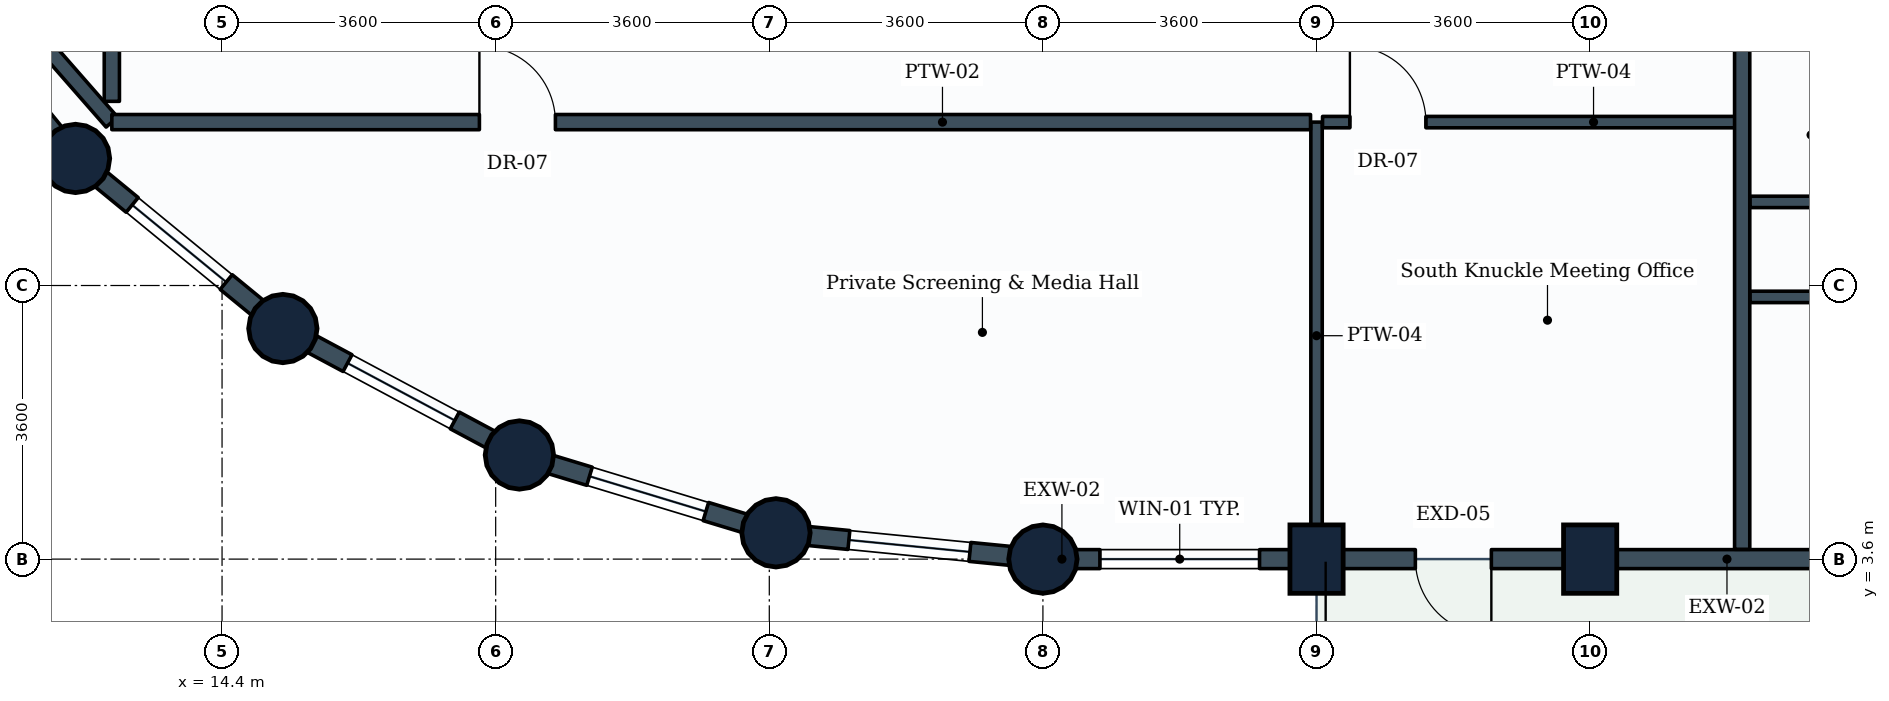
"""IFC4 building model, lengths in metres.
Left out: names, types, materials, properties, quantities, classifications, styles, units other than length and angle.
Written with IfcOpenShell. Run it as: python <this file> out.ifc"""

import sys

from ifc_helpers import new_model, si_unit, direction, frame, frame_2d, origin, origin_2d, place, context, subcontext, project, spatial, rectangle, circle, extrude, element, fill, save


model = new_model("IFC4")
c1 = context("Model", 3, precision=1e-05, world=origin(), true_north=direction((0.0, 1.0)))
c2 = subcontext(c1, "Body", "Model", "MODEL_VIEW")
j1 = project(units=[si_unit("LENGTHUNIT", "METRE"), si_unit("PLANEANGLEUNIT", "RADIAN")], contexts=[c1])
p1 = place(None, origin())
s1 = spatial("IfcSite", under=j1, at=p1, CompositionType="ELEMENT")
p2 = place(p1, origin())
s2 = spatial("IfcBuilding", under=s1, at=p2, CompositionType="ELEMENT")
p3 = place(p2, frame((0.0, 0.0, 178.6)))
s3 = spatial("IfcBuildingStorey", under=s2, at=p3, CompositionType="ELEMENT", Elevation=178.6)
for number, where, z_axis, x_axis in (
    (1, (12.472, 8.872, 0.0), (0.0, 0.0, 1.0), (1.0, 0.0, 0.0)),
    (2, (15.2, 6.634, 0.0), (0.0, 0.0, 1.0), (1.0, 0.0, 0.0)),
    (3, (18.312, 4.97, 0.0), (0.0, 0.0, 1.0), (1.0, 0.0, 0.0)),
    (4, (21.688, 3.946, 0.0), (0.0, 0.0, 1.0), (1.0, 0.0, 0.0)),
    (5, (25.2, 3.6, 0.0), (0.0, 0.0, 1.0), (1.0, 0.0, 0.0)),
):
    element("IfcColumn", number, at=place(p3, frame(where, z_axis=z_axis, x_axis=x_axis)), inside=s3, PredefinedType="COLUMN", context=c2, shape_type="SweptSolid", body=[
        extrude(circle(Radius=0.45, at=origin_2d()), origin(), (0.0, 0.0, 1.0), 3.8),
    ])
for number, where, z_axis, x_axis in (
    (6, (28.8, 3.6, 0.0), (0.0, 0.0, 1.0), (1.0, 0.0, 0.0)),
    (7, (32.4, 3.6, 0.0), (0.0, 0.0, 1.0), (1.0, 0.0, 0.0)),
):
    element("IfcColumn", number, at=place(p3, frame(where, z_axis=z_axis, x_axis=x_axis)), inside=s3, PredefinedType="COLUMN", context=c2, shape_type="SweptSolid", body=[
        extrude(rectangle(XDim=0.7, YDim=0.9, at=origin_2d()), origin(), (0.0, 0.0, 1.0), 3.8),
    ])
p4 = place(p3, frame((28.8, 3.6, 0.0), z_axis=(0.0, 0.0, 1.0), x_axis=(-1.0, 0.0, 0.0)))
e8 = element("IfcWall", 8, at=p4, inside=s3, PredefinedType="STANDARD", context=c2, shape_type="SweptSolid", body=[
    extrude(rectangle(XDim=3.6, YDim=0.25, at=frame_2d((1.8, 0.0))), origin(), (0.0, 0.0, 1.0), 2.93),
])
p5 = place(p4, frame((0.75, 0.0, 0.85)))
e9 = element("IfcOpeningElement", 9, at=p5, cuts=e8, PredefinedType="OPENING", context=c2, shape_type="SweptSolid", body=[
    extrude(rectangle(XDim=2.1, YDim=1.35, at=frame_2d((1.05, 0.675))), frame((0.0, 0.135, 0.0), z_axis=(0.0, -1.0, 0.0), x_axis=(1.0, 0.0, 0.0)), (0.0, 0.0, 1.0), 0.27),
])
p6 = place(p3, frame((32.4, 3.6, 0.0), z_axis=(0.0, 0.0, 1.0), x_axis=(-1.0, 0.0, 0.0)))
e10 = element("IfcWall", 10, at=p6, inside=s3, PredefinedType="STANDARD", context=c2, shape_type="SweptSolid", body=[
    extrude(rectangle(XDim=3.6, YDim=0.25, at=frame_2d((1.8, 0.0))), origin(), (0.0, 0.0, 1.0), 2.93),
])
p7 = place(p6, frame((1.3, 0.0, 0.0)))
e11 = element("IfcOpeningElement", 11, at=p7, cuts=e10, PredefinedType="OPENING", context=c2, shape_type="SweptSolid", body=[
    extrude(rectangle(XDim=1.0, YDim=2.1, at=frame_2d((0.5, 1.05))), frame((0.0, 0.135, 0.0), z_axis=(0.0, -1.0, 0.0), x_axis=(1.0, 0.0, 0.0)), (0.0, 0.0, 1.0), 0.27),
])
p8 = place(p3, frame((36.0, 3.6, 0.0), z_axis=(0.0, 0.0, 1.0), x_axis=(-1.0, 0.0, 0.0)))
e12 = element("IfcWall", 12, at=p8, inside=s3, PredefinedType="STANDARD", context=c2, shape_type="SweptSolid", body=[
    extrude(rectangle(XDim=3.6, YDim=0.25, at=frame_2d((1.8, 0.0))), origin(), (0.0, 0.0, 1.0), 2.93),
])
p9 = place(p3, frame((12.472, 8.872, 0.0), z_axis=(0.0, 0.0, 1.0), x_axis=(-0.634258295121, 0.773121216285, 0.0)))
e13 = element("IfcWall", 13, at=p9, inside=s3, PredefinedType="STANDARD", context=c2, shape_type="SweptSolid", body=[
    extrude(rectangle(XDim=3.529, YDim=0.25, at=frame_2d((1.764, 0.0))), origin(), (0.0, 0.0, 1.0), 2.93),
])
p10 = place(p9, frame((0.964, 0.0, 0.85)))
e14 = element("IfcOpeningElement", 14, at=p10, cuts=e13, PredefinedType="OPENING", context=c2, shape_type="SweptSolid", body=[
    extrude(rectangle(XDim=1.6, YDim=1.35, at=frame_2d((0.8, 0.675))), frame((0.0, 0.135, 0.0), z_axis=(0.0, -1.0, 0.0), x_axis=(1.0, 0.0, 0.0)), (0.0, 0.0, 1.0), 0.27),
])
p11 = place(p3, frame((15.2, 6.634, 0.0), z_axis=(0.0, 0.0, 1.0), x_axis=(-0.773121216285, 0.634258295121, 0.0)))
e15 = element("IfcWall", 15, at=p11, inside=s3, PredefinedType="STANDARD", context=c2, shape_type="SweptSolid", body=[
    extrude(rectangle(XDim=3.529, YDim=0.25, at=frame_2d((1.764, 0.0))), origin(), (0.0, 0.0, 1.0), 2.93),
])
p12 = place(p11, frame((0.964, 0.0, 0.85)))
e16 = element("IfcOpeningElement", 16, at=p12, cuts=e15, PredefinedType="OPENING", context=c2, shape_type="SweptSolid", body=[
    extrude(rectangle(XDim=1.6, YDim=1.35, at=frame_2d((0.8, 0.675))), frame((0.0, 0.135, 0.0), z_axis=(0.0, -1.0, 0.0), x_axis=(1.0, 0.0, 0.0)), (0.0, 0.0, 1.0), 0.27),
])
p13 = place(p3, frame((18.312, 4.97, 0.0), z_axis=(0.0, 0.0, 1.0), x_axis=(-0.881846862014, 0.471535907389, 0.0)))
e17 = element("IfcWall", 17, at=p13, inside=s3, PredefinedType="STANDARD", context=c2, shape_type="SweptSolid", body=[
    extrude(rectangle(XDim=3.529, YDim=0.25, at=frame_2d((1.765, 0.0))), origin(), (0.0, 0.0, 1.0), 2.93),
])
p14 = place(p13, frame((0.964, 0.0, 0.85)))
e18 = element("IfcOpeningElement", 18, at=p14, cuts=e17, PredefinedType="OPENING", context=c2, shape_type="SweptSolid", body=[
    extrude(rectangle(XDim=1.6, YDim=1.35, at=frame_2d((0.8, 0.675))), frame((0.0, 0.135, 0.0), z_axis=(0.0, -1.0, 0.0), x_axis=(1.0, 0.0, 0.0)), (0.0, 0.0, 1.0), 0.27),
])
p15 = place(p3, frame((21.688, 3.946, 0.0), z_axis=(0.0, 0.0, 1.0), x_axis=(-0.956953367403, 0.290241714123, 0.0)))
e19 = element("IfcWall", 19, at=p15, inside=s3, PredefinedType="STANDARD", context=c2, shape_type="SweptSolid", body=[
    extrude(rectangle(XDim=3.528, YDim=0.25, at=frame_2d((1.764, 0.0))), origin(), (0.0, 0.0, 1.0), 2.93),
])
p16 = place(p15, frame((0.964, 0.0, 0.85)))
e20 = element("IfcOpeningElement", 20, at=p16, cuts=e19, PredefinedType="OPENING", context=c2, shape_type="SweptSolid", body=[
    extrude(rectangle(XDim=1.6, YDim=1.35, at=frame_2d((0.8, 0.675))), frame((0.0, 0.135, 0.0), z_axis=(0.0, -1.0, 0.0), x_axis=(1.0, 0.0, 0.0)), (0.0, 0.0, 1.0), 0.27),
])
p17 = place(p3, frame((25.2, 3.6, 0.0), z_axis=(0.0, 0.0, 1.0), x_axis=(-0.995183369056, 0.098030923459, 0.0)))
e21 = element("IfcWall", 21, at=p17, inside=s3, PredefinedType="STANDARD", context=c2, shape_type="SweptSolid", body=[
    extrude(rectangle(XDim=3.529, YDim=0.25, at=frame_2d((1.765, 0.0))), origin(), (0.0, 0.0, 1.0), 2.93),
])
p18 = place(p17, frame((0.965, 0.0, 0.85)))
e22 = element("IfcOpeningElement", 22, at=p18, cuts=e21, PredefinedType="OPENING", context=c2, shape_type="SweptSolid", body=[
    extrude(rectangle(XDim=1.6, YDim=1.35, at=frame_2d((0.8, 0.675))), frame((0.0, 0.135, 0.0), z_axis=(0.0, -1.0, 0.0), x_axis=(1.0, 0.0, 0.0)), (0.0, 0.0, 1.0), 0.27),
])
p19 = place(p3, frame((28.8, 9.35, 0.0), z_axis=(0.0, 0.0, 1.0), x_axis=(0.0, -1.0, 0.0)))
e23 = element("IfcWall", 23, at=p19, inside=s3, PredefinedType="PARTITIONING", context=c2, shape_type="SweptSolid", body=[
    extrude(rectangle(XDim=5.621, YDim=0.15, at=frame_2d((2.811, 0.0))), origin(), (0.0, 0.0, 1.0), 3.535),
])
p20 = place(p3, frame((12.95, 9.35, 0.0), z_axis=(0.0, 0.0, 1.0), x_axis=(-0.658639514157, 0.752458630352, 0.0)))
e24 = element("IfcWall", 24, at=p20, inside=s3, PredefinedType="PARTITIONING", context=c2, shape_type="SweptSolid", body=[
    extrude(rectangle(XDim=4.996, YDim=0.2, at=frame_2d((2.498, 0.0))), origin(), (0.0, 0.0, 1.0), 2.93),
])
p21 = place(p3, frame((12.95, 9.623, 0.0), z_axis=(0.0, 0.0, 1.0), x_axis=(0.0, 1.0, 0.0)))
e25 = element("IfcWall", 25, at=p21, inside=s3, PredefinedType="PARTITIONING", context=c2, shape_type="SweptSolid", body=[
    extrude(rectangle(XDim=6.873, YDim=0.2, at=frame_2d((3.437, 0.0))), origin(), (0.0, 0.0, 1.0), 3.17),
])
p22 = place(p21, frame((3.958, 0.0, 0.0)))
e26 = element("IfcOpeningElement", 26, at=p22, cuts=e25, PredefinedType="OPENING", context=c2, shape_type="SweptSolid", body=[
    extrude(rectangle(XDim=1.0, YDim=2.1, at=frame_2d((0.5, 1.05))), frame((0.0, 0.11, 0.0), z_axis=(0.0, -1.0, 0.0), x_axis=(1.0, 0.0, 0.0)), (0.0, 0.0, 1.0), 0.22),
])
p23 = place(p3, frame((12.95, 9.35, 0.0), z_axis=(0.0, 0.0, 1.0), x_axis=(1.0, 0.0, 0.0)))
e27 = element("IfcWall", 27, at=p23, inside=s3, PredefinedType="PARTITIONING", context=c2, shape_type="SweptSolid", body=[
    extrude(rectangle(XDim=15.771, YDim=0.2, at=frame_2d((7.885, 0.0))), origin(), (0.0, 0.0, 1.0), 3.17),
])
p24 = place(p23, frame((4.836, 0.0, 0.0)))
e28 = element("IfcOpeningElement", 28, at=p24, cuts=e27, PredefinedType="OPENING", context=c2, shape_type="SweptSolid", body=[
    extrude(rectangle(XDim=1.0, YDim=2.1, at=frame_2d((0.5, 1.05))), frame((0.0, 0.11, 0.0), z_axis=(0.0, -1.0, 0.0), x_axis=(1.0, 0.0, 0.0)), (0.0, 0.0, 1.0), 0.22),
])
p25 = place(p3, frame((28.879, 9.35, 0.0), z_axis=(0.0, 0.0, 1.0), x_axis=(1.0, 0.0, 0.0)))
e29 = element("IfcWall", 29, at=p25, inside=s3, PredefinedType="PARTITIONING", context=c2, shape_type="SweptSolid", body=[
    extrude(rectangle(XDim=5.521, YDim=0.15, at=frame_2d((2.76, 0.0))), origin(), (0.0, 0.0, 1.0), 3.535),
])
p26 = place(p25, frame((0.36, 0.0, 0.0)))
e30 = element("IfcOpeningElement", 30, at=p26, cuts=e29, PredefinedType="OPENING", context=c2, shape_type="SweptSolid", body=[
    extrude(rectangle(XDim=1.0, YDim=2.1, at=frame_2d((0.5, 1.05))), frame((0.0, 0.085, 0.0), z_axis=(0.0, -1.0, 0.0), x_axis=(1.0, 0.0, 0.0)), (0.0, 0.0, 1.0), 0.17),
])
p27 = place(p3, frame((34.4, 3.729, 0.0), z_axis=(0.0, 0.0, 1.0), x_axis=(0.0, 1.0, 0.0)))
e31 = element("IfcWall", 31, at=p27, inside=s3, PredefinedType="PARTITIONING", context=c2, shape_type="SweptSolid", body=[
    extrude(rectangle(XDim=6.921, YDim=0.2, at=frame_2d((3.46, 0.0))), origin(), (0.0, 0.0, 1.0), 2.93),
])
p28 = place(p3, frame((34.504, 8.3, 0.0), z_axis=(0.0, 0.0, 1.0), x_axis=(1.0, 0.0, 0.0)))
e32 = element("IfcWall", 32, at=p28, inside=s3, PredefinedType="PARTITIONING", context=c2, shape_type="SweptSolid", body=[
    extrude(rectangle(XDim=2.217, YDim=0.15, at=frame_2d((1.108, 0.0))), origin(), (0.0, 0.0, 1.0), 3.22),
])
p29 = place(p3, frame((34.504, 7.05, 0.0), z_axis=(0.0, 0.0, 1.0), x_axis=(1.0, 0.0, 0.0)))
e33 = element("IfcWall", 33, at=p29, inside=s3, PredefinedType="PARTITIONING", context=c2, shape_type="SweptSolid", body=[
    extrude(rectangle(XDim=2.996, YDim=0.15, at=frame_2d((1.498, 0.0))), origin(), (0.0, 0.0, 1.0), 3.17),
])
p30 = place(p29, frame((1.021, 0.0, 0.0)))
e34 = element("IfcOpeningElement", 34, at=p30, cuts=e33, PredefinedType="OPENING", context=c2, shape_type="SweptSolid", body=[
    extrude(rectangle(XDim=0.85, YDim=2.1, at=frame_2d((0.425, 1.05))), frame((0.0, 0.085, 0.0), z_axis=(0.0, -1.0, 0.0), x_axis=(1.0, 0.0, 0.0)), (0.0, 0.0, 1.0), 0.17),
])
p31 = place(p5, origin())
e35 = element("IfcWindow", 35, at=p31, inside=s3, PartitioningType="SINGLE_PANEL", PredefinedType="WINDOW", context=c2, shape_type="SweptSolid", body=[
    extrude(rectangle(XDim=2.1, YDim=1.35, at=frame_2d((1.05, 0.675))), frame((0.0, 0.03, 0.0), z_axis=(0.0, -1.0, 0.0), x_axis=(1.0, 0.0, 0.0)), (0.0, 0.0, 1.0), 0.06),
])
fill(e9, e35)
p32 = place(p7, origin())
e36 = element("IfcDoor", 36, at=p32, inside=s3, OperationType="SINGLE_SWING_LEFT", PredefinedType="DOOR", context=c2, shape_type="SweptSolid", body=[
    extrude(rectangle(XDim=1.0, YDim=2.1, at=frame_2d((0.5, 1.05))), frame((0.0, 0.025, 0.0), z_axis=(0.0, -1.0, 0.0), x_axis=(1.0, 0.0, 0.0)), (0.0, 0.0, 1.0), 0.05),
])
fill(e11, e36)
p33 = place(p12, origin())
e37 = element("IfcWindow", 37, at=p33, inside=s3, PartitioningType="SINGLE_PANEL", PredefinedType="WINDOW", context=c2, shape_type="SweptSolid", body=[
    extrude(rectangle(XDim=1.6, YDim=1.35, at=frame_2d((0.8, 0.675))), frame((0.0, 0.03, 0.0), z_axis=(0.0, -1.0, 0.0), x_axis=(1.0, 0.0, 0.0)), (0.0, 0.0, 1.0), 0.06),
])
fill(e16, e37)
p34 = place(p14, origin())
e38 = element("IfcWindow", 38, at=p34, inside=s3, PartitioningType="SINGLE_PANEL", PredefinedType="WINDOW", context=c2, shape_type="SweptSolid", body=[
    extrude(rectangle(XDim=1.6, YDim=1.35, at=frame_2d((0.8, 0.675))), frame((0.0, 0.03, 0.0), z_axis=(0.0, -1.0, 0.0), x_axis=(1.0, 0.0, 0.0)), (0.0, 0.0, 1.0), 0.06),
])
fill(e18, e38)
p35 = place(p16, origin())
e39 = element("IfcWindow", 39, at=p35, inside=s3, PartitioningType="SINGLE_PANEL", PredefinedType="WINDOW", context=c2, shape_type="SweptSolid", body=[
    extrude(rectangle(XDim=1.6, YDim=1.35, at=frame_2d((0.8, 0.675))), frame((0.0, 0.03, 0.0), z_axis=(0.0, -1.0, 0.0), x_axis=(1.0, 0.0, 0.0)), (0.0, 0.0, 1.0), 0.06),
])
fill(e20, e39)
p36 = place(p18, origin())
e40 = element("IfcWindow", 40, at=p36, inside=s3, PartitioningType="SINGLE_PANEL", PredefinedType="WINDOW", context=c2, shape_type="SweptSolid", body=[
    extrude(rectangle(XDim=1.6, YDim=1.35, at=frame_2d((0.8, 0.675))), frame((0.0, 0.03, 0.0), z_axis=(0.0, -1.0, 0.0), x_axis=(1.0, 0.0, 0.0)), (0.0, 0.0, 1.0), 0.06),
])
fill(e22, e40)
p37 = place(p24, origin())
e41 = element("IfcDoor", 41, at=p37, inside=s3, OperationType="SINGLE_SWING_LEFT", PredefinedType="DOOR", context=c2, shape_type="SweptSolid", body=[
    extrude(rectangle(XDim=1.0, YDim=2.1, at=frame_2d((0.5, 1.05))), frame((0.0, 0.025, 0.0), z_axis=(0.0, -1.0, 0.0), x_axis=(1.0, 0.0, 0.0)), (0.0, 0.0, 1.0), 0.05),
])
fill(e28, e41)
p38 = place(p26, origin())
e42 = element("IfcDoor", 42, at=p38, inside=s3, OperationType="SINGLE_SWING_LEFT", PredefinedType="DOOR", context=c2, shape_type="SweptSolid", body=[
    extrude(rectangle(XDim=1.0, YDim=2.1, at=frame_2d((0.5, 1.05))), frame((0.0, 0.025, 0.0), z_axis=(0.0, -1.0, 0.0), x_axis=(1.0, 0.0, 0.0)), (0.0, 0.0, 1.0), 0.05),
])
fill(e30, e42)
save(model, sys.argv[1])
